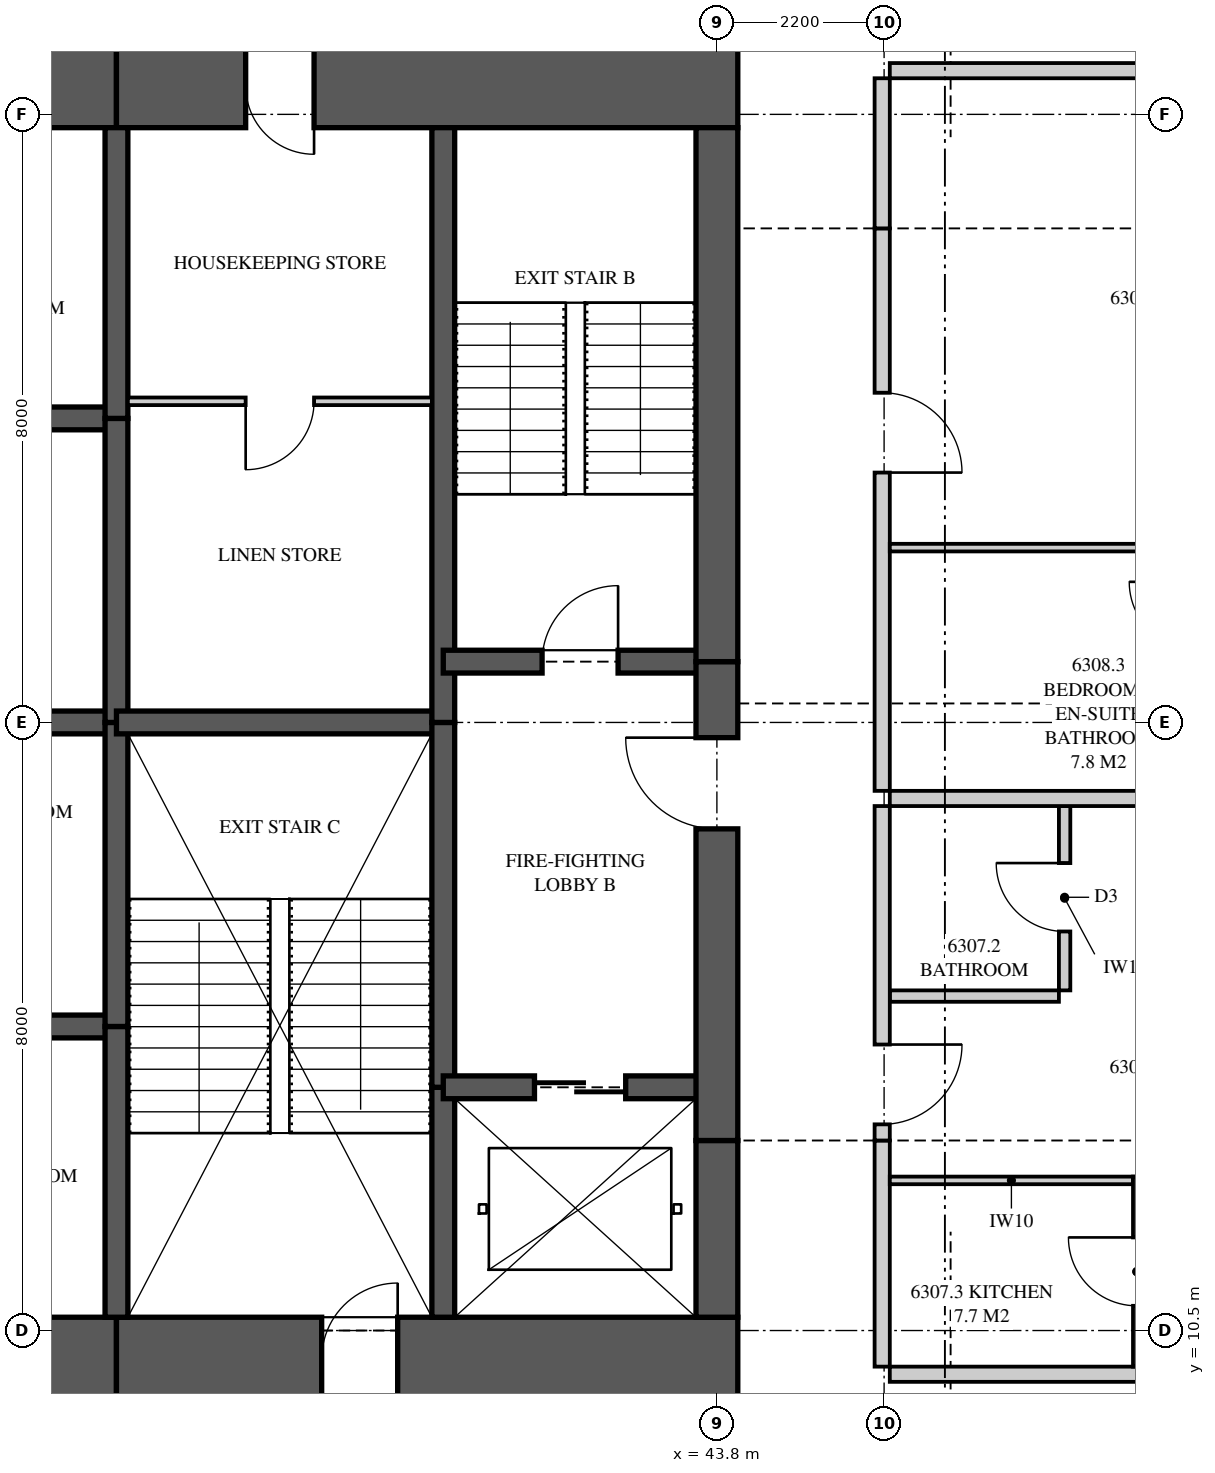
"""IFC4 building model, lengths in metres.
Left out: names, types, materials, properties, quantities, classifications, styles, units other than length and angle.
Written with IfcOpenShell. Run it as: python <this file> out.ifc"""

import sys

from ifc_helpers import new_model, si_unit, direction, frame, frame_2d, origin, place, context, subcontext, project, spatial, polyline, rectangle, outline, extrude, element, fill, save


model = new_model("IFC4")
c1 = context("Model", 3, precision=1e-05, world=origin(), true_north=direction((0.0, 1.0)))
c2 = subcontext(c1, "Body", "Model", "MODEL_VIEW")
j1 = project(units=[si_unit("LENGTHUNIT", "METRE"), si_unit("PLANEANGLEUNIT", "RADIAN")], contexts=[c1])
p1 = place(None, origin())
s1 = spatial("IfcSite", under=j1, at=p1, CompositionType="ELEMENT")
p2 = place(p1, origin())
s2 = spatial("IfcBuilding", under=s1, at=p2, CompositionType="ELEMENT")
p3 = place(p2, frame((0.0, 0.0, 231.95)))
s3 = spatial("IfcBuildingStorey", under=s2, at=p3, CompositionType="ELEMENT", Elevation=231.95)
p4 = place(p3, frame((31.6, 10.125, 0.0), z_axis=(0.0, 0.0, 1.0), x_axis=(1.0, 0.0, 0.0)))
e1 = element("IfcWall", 1, at=p4, inside=s3, PredefinedType="SHEAR", context=c2, shape_type="SweptSolid", body=[
    extrude(rectangle(XDim=4.3, YDim=1.1, at=frame_2d((2.15, 0.0))), origin(), (0.0, 0.0, 1.0), 3.5),
])
p5 = place(p3, frame((35.9, 10.125, 0.0), z_axis=(0.0, 0.0, 1.0), x_axis=(1.0, 0.0, 0.0)))
e2 = element("IfcWall", 2, at=p5, inside=s3, PredefinedType="SHEAR", context=c2, shape_type="SweptSolid", body=[
    extrude(rectangle(XDim=8.175, YDim=1.1, at=frame_2d((4.087, 0.0))), origin(), (0.0, 0.0, 1.0), 3.5),
])
p6 = place(p5, frame((2.7, 0.0, 0.0)))
e3 = element("IfcOpeningElement", 3, at=p6, cuts=e2, PredefinedType="OPENING", context=c2, shape_type="SweptSolid", body=[
    extrude(rectangle(XDim=1.0, YDim=2.1, at=frame_2d((0.5, 1.05))), frame((0.0, 0.56, 0.0), z_axis=(0.0, -1.0, 0.0), x_axis=(1.0, 0.0, 0.0)), (0.0, 0.0, 1.0), 1.12),
])
p7 = place(p3, frame((44.075, 26.875, 0.0), z_axis=(0.0, 0.0, 1.0), x_axis=(-1.0, 0.0, 0.0)))
e4 = element("IfcWall", 4, at=p7, inside=s3, PredefinedType="SHEAR", context=c2, shape_type="SweptSolid", body=[
    extrude(rectangle(XDim=8.175, YDim=1.1, at=frame_2d((4.087, 0.0))), origin(), (0.0, 0.0, 1.0), 3.5),
])
p8 = place(p7, frame((5.575, 0.0, 0.0)))
e5 = element("IfcOpeningElement", 5, at=p8, cuts=e4, PredefinedType="OPENING", context=c2, shape_type="SweptSolid", body=[
    extrude(rectangle(XDim=0.9, YDim=2.1, at=frame_2d((0.45, 1.05))), frame((0.0, 0.56, 0.0), z_axis=(0.0, -1.0, 0.0), x_axis=(1.0, 0.0, 0.0)), (0.0, 0.0, 1.0), 1.12),
])
p9 = place(p3, frame((35.9, 26.875, 0.0), z_axis=(0.0, 0.0, 1.0), x_axis=(-1.0, 0.0, 0.0)))
e6 = element("IfcWall", 6, at=p9, inside=s3, PredefinedType="SHEAR", context=c2, shape_type="SweptSolid", body=[
    extrude(rectangle(XDim=4.3, YDim=1.1, at=frame_2d((2.15, 0.0))), origin(), (0.0, 0.0, 1.0), 3.5),
])
p10 = place(p3, frame((43.8, 10.675, 0.0), z_axis=(0.0, 0.0, 1.0), x_axis=(0.0, 1.0, 0.0)))
e7 = element("IfcWall", 7, at=p10, inside=s3, PredefinedType="SHEAR", context=c2, shape_type="SweptSolid", body=[
    extrude(rectangle(XDim=2.325, YDim=0.55, at=frame_2d((1.163, 0.0))), origin(), (0.0, 0.0, 1.0), 3.5),
])
p11 = place(p3, frame((43.8, 13.0, 0.0), z_axis=(0.0, 0.0, 1.0), x_axis=(0.0, 1.0, 0.0)))
e8 = element("IfcWall", 8, at=p11, inside=s3, PredefinedType="SHEAR", context=c2, shape_type="SweptSolid", body=[
    extrude(rectangle(XDim=6.3, YDim=0.55, at=frame_2d((3.15, 0.0))), origin(), (0.0, 0.0, 1.0), 3.5),
])
p12 = place(p11, frame((4.1, 0.0, 0.0)))
e9 = element("IfcOpeningElement", 9, at=p12, cuts=e8, PredefinedType="OPENING", context=c2, shape_type="SweptSolid", body=[
    extrude(rectangle(XDim=1.2, YDim=2.2, at=frame_2d((0.6, 1.1))), frame((0.0, 0.285, 0.0), z_axis=(0.0, -1.0, 0.0), x_axis=(1.0, 0.0, 0.0)), (0.0, 0.0, 1.0), 0.57),
])
p13 = place(p3, frame((43.8, 19.3, 0.0), z_axis=(0.0, 0.0, 1.0), x_axis=(0.0, 1.0, 0.0)))
e10 = element("IfcWall", 10, at=p13, inside=s3, PredefinedType="SHEAR", context=c2, shape_type="SweptSolid", body=[
    extrude(rectangle(XDim=7.025, YDim=0.55, at=frame_2d((3.512, 0.0))), origin(), (0.0, 0.0, 1.0), 3.5),
])
p14 = place(p3, frame((35.9, 10.675, 0.0), z_axis=(0.0, 0.0, 1.0), x_axis=(0.0, 1.0, 0.0)))
e11 = element("IfcWall", 11, at=p14, inside=s3, PredefinedType="SHEAR", context=c2, shape_type="SweptSolid", body=[
    extrude(rectangle(XDim=3.825, YDim=0.3, at=frame_2d((1.913, 0.0))), origin(), (0.0, 0.0, 1.0), 3.5),
])
for number, where, z_axis, x_axis in (
    (12, (35.9, 14.5, 0.0), (0.0, 0.0, 1.0), (0.0, 1.0, 0.0)),
    (13, (35.9, 18.5, 0.0), (0.0, 0.0, 1.0), (0.0, 1.0, 0.0)),
):
    element("IfcWall", number, at=place(p3, frame(where, z_axis=z_axis, x_axis=x_axis)), inside=s3, PredefinedType="SHEAR", context=c2, shape_type="SweptSolid", body=[
        extrude(rectangle(XDim=4.0, YDim=0.3, at=frame_2d((2.0, 0.0))), origin(), (0.0, 0.0, 1.0), 3.5),
    ])
p15 = place(p3, frame((35.9, 22.5, 0.0), z_axis=(0.0, 0.0, 1.0), x_axis=(0.0, 1.0, 0.0)))
e14 = element("IfcWall", 14, at=p15, inside=s3, PredefinedType="SHEAR", context=c2, shape_type="SweptSolid", body=[
    extrude(rectangle(XDim=3.825, YDim=0.3, at=frame_2d((1.913, 0.0))), origin(), (0.0, 0.0, 1.0), 3.5),
])
p16 = place(p3, frame((40.2, 10.675, 0.0), z_axis=(0.0, 0.0, 1.0), x_axis=(0.0, 1.0, 0.0)))
e15 = element("IfcWall", 15, at=p16, inside=s3, PredefinedType="SHEAR", context=c2, shape_type="SweptSolid", body=[
    extrude(rectangle(XDim=3.025, YDim=0.3, at=frame_2d((1.512, 0.0))), origin(), (0.0, 0.0, 1.0), 3.5),
])
p17 = place(p3, frame((40.2, 13.7, 0.0), z_axis=(0.0, 0.0, 1.0), x_axis=(0.0, 1.0, 0.0)))
e16 = element("IfcWall", 16, at=p17, inside=s3, PredefinedType="SHEAR", context=c2, shape_type="SweptSolid", body=[
    extrude(rectangle(XDim=4.8, YDim=0.3, at=frame_2d((2.4, 0.0))), origin(), (0.0, 0.0, 1.0), 3.5),
])
p18 = place(p3, frame((40.2, 18.5, 0.0), z_axis=(0.0, 0.0, 1.0), x_axis=(0.0, 1.0, 0.0)))
e17 = element("IfcWall", 17, at=p18, inside=s3, PredefinedType="SHEAR", context=c2, shape_type="SweptSolid", body=[
    extrude(rectangle(XDim=7.825, YDim=0.3, at=frame_2d((3.913, 0.0))), origin(), (0.0, 0.0, 1.0), 3.5),
])
for number, where, z_axis, x_axis in (
    (18, (31.6, 14.5, 0.0), (0.0, 0.0, 1.0), (1.0, 0.0, 0.0)),
    (19, (31.6, 18.5, 0.0), (0.0, 0.0, 1.0), (1.0, 0.0, 0.0)),
    (20, (31.6, 22.5, 0.0), (0.0, 0.0, 1.0), (1.0, 0.0, 0.0)),
):
    element("IfcWall", number, at=place(p3, frame(where, z_axis=z_axis, x_axis=x_axis)), inside=s3, PredefinedType="SHEAR", context=c2, shape_type="SweptSolid", body=[
        extrude(rectangle(XDim=4.3, YDim=0.3, at=frame_2d((2.15, 0.0))), origin(), (0.0, 0.0, 1.0), 3.5),
    ])
p19 = place(p3, frame((35.9, 18.5, 0.0), z_axis=(0.0, 0.0, 1.0), x_axis=(1.0, 0.0, 0.0)))
e21 = element("IfcWall", 21, at=p19, inside=s3, PredefinedType="SHEAR", context=c2, shape_type="SweptSolid", body=[
    extrude(rectangle(XDim=4.3, YDim=0.3, at=frame_2d((2.15, 0.0))), origin(), (0.0, 0.0, 1.0), 3.5),
])
p20 = place(p3, frame((40.2, 13.7, 0.0), z_axis=(0.0, 0.0, 1.0), x_axis=(1.0, 0.0, 0.0)))
e22 = element("IfcWall", 22, at=p20, inside=s3, PredefinedType="SHEAR", context=c2, shape_type="SweptSolid", body=[
    extrude(rectangle(XDim=3.6, YDim=0.3, at=frame_2d((1.8, 0.0))), origin(), (0.0, 0.0, 1.0), 3.5),
])
p21 = place(p20, frame((1.2, 0.0, 0.0)))
e23 = element("IfcOpeningElement", 23, at=p21, cuts=e22, PredefinedType="OPENING", context=c2, shape_type="SweptSolid", body=[
    extrude(rectangle(XDim=1.2, YDim=2.1, at=frame_2d((0.6, 1.05))), frame((0.0, 0.16, 0.0), z_axis=(0.0, -1.0, 0.0), x_axis=(1.0, 0.0, 0.0)), (0.0, 0.0, 1.0), 0.32),
])
p22 = place(p3, frame((40.2, 19.3, 0.0), z_axis=(0.0, 0.0, 1.0), x_axis=(1.0, 0.0, 0.0)))
e24 = element("IfcWall", 24, at=p22, inside=s3, PredefinedType="SHEAR", context=c2, shape_type="SweptSolid", body=[
    extrude(rectangle(XDim=3.6, YDim=0.3, at=frame_2d((1.8, 0.0))), origin(), (0.0, 0.0, 1.0), 3.5),
])
p23 = place(p22, frame((1.3, 0.0, 0.0)))
e25 = element("IfcOpeningElement", 25, at=p23, cuts=e24, PredefinedType="OPENING", context=c2, shape_type="SweptSolid", body=[
    extrude(rectangle(XDim=1.0, YDim=2.1, at=frame_2d((0.5, 1.05))), frame((0.0, 0.16, 0.0), z_axis=(0.0, -1.0, 0.0), x_axis=(1.0, 0.0, 0.0)), (0.0, 0.0, 1.0), 0.32),
])
p24 = place(p3, frame((46.075, 9.925, 0.0), z_axis=(0.0, 0.0, 1.0), x_axis=(1.0, 0.0, 0.0)))
e26 = element("IfcWall", 26, at=p24, inside=s3, PredefinedType="PARTITIONING", context=c2, shape_type="SweptSolid", body=[
    extrude(outline(polyline([(0.0, 0.0), (10.25, 0.0), (10.25, 3.26), (10.033, 3.26), (10.033, 2.3), (8.201, 2.3), (8.201, 3.26), (2.11, 3.26), (2.11, 2.66), (0.0, 2.66), (0.0, 3.26), (0.0, 0.0)])), frame((0.0, 0.1, 0.0), z_axis=(0.0, -1.0, 0.0), x_axis=(1.0, 0.0, 0.0)), (0.0, 0.0, 1.0), 0.2),
])
p25 = place(p3, frame((46.075, 27.075, 0.0), z_axis=(0.0, 0.0, 1.0), x_axis=(1.0, 0.0, 0.0)))
e27 = element("IfcWall", 27, at=p25, inside=s3, PredefinedType="PARTITIONING", context=c2, shape_type="SweptSolid", body=[
    extrude(outline(polyline([(0.0, 0.0), (10.25, 0.0), (10.25, 3.26), (10.017, 3.26), (10.017, 2.3), (8.166, 2.3), (8.166, 3.26), (2.11, 3.26), (2.11, 2.66), (0.0, 2.66), (0.0, 3.26), (0.0, 0.0)])), frame((0.0, 0.1, 0.0), z_axis=(0.0, -1.0, 0.0), x_axis=(1.0, 0.0, 0.0)), (0.0, 0.0, 1.0), 0.2),
])
p26 = place(p3, frame((56.325, 17.5, 0.0), z_axis=(0.0, 0.0, 1.0), x_axis=(-1.0, 0.0, 0.0)))
e28 = element("IfcWall", 28, at=p26, inside=s3, PredefinedType="PARTITIONING", context=c2, shape_type="SweptSolid", body=[
    extrude(outline(polyline([(0.0, 0.0), (10.25, 0.0), (10.25, 3.26), (10.25, 2.66), (1.685, 2.66), (1.685, 2.3), (0.0, 2.3), (0.0, 3.26), (0.0, 0.0)])), frame((0.0, 0.1, 0.0), z_axis=(0.0, -1.0, 0.0), x_axis=(1.0, 0.0, 0.0)), (0.0, 0.0, 1.0), 0.2),
])
p27 = place(p3, frame((45.975, 10.025, 0.0), z_axis=(0.0, 0.0, 1.0), x_axis=(0.0, 1.0, 0.0)))
e29 = element("IfcWall", 29, at=p27, inside=s3, PredefinedType="PARTITIONING", context=c2, shape_type="SweptSolid", body=[
    extrude(rectangle(XDim=2.975, YDim=0.2, at=frame_2d((1.488, 0.0))), origin(), (0.0, 0.0, 1.0), 2.66),
])
p28 = place(p3, frame((45.975, 13.0, 0.0), z_axis=(0.0, 0.0, 1.0), x_axis=(0.0, 1.0, 0.0)))
e30 = element("IfcWall", 30, at=p28, inside=s3, PredefinedType="PARTITIONING", context=c2, shape_type="SweptSolid", body=[
    extrude(outline(polyline([(0.0, 0.0), (4.4, 0.0), (4.4, 3.26), (1.31, 3.26), (1.31, 2.66), (0.0, 2.66), (0.0, 0.0)])), frame((0.0, 0.1, 0.0), z_axis=(0.0, -1.0, 0.0), x_axis=(1.0, 0.0, 0.0)), (0.0, 0.0, 1.0), 0.2),
])
p29 = place(p28, frame((0.212, 0.0, 0.0)))
e31 = element("IfcOpeningElement", 31, at=p29, cuts=e30, PredefinedType="OPENING", context=c2, shape_type="SweptSolid", body=[
    extrude(rectangle(XDim=1.05, YDim=2.2, at=frame_2d((0.525, 1.1))), frame((0.0, 0.11, 0.0), z_axis=(0.0, -1.0, 0.0), x_axis=(1.0, 0.0, 0.0)), (0.0, 0.0, 1.0), 0.22),
])
p30 = place(p3, frame((48.375, 14.975, 0.0), z_axis=(0.0, 0.0, 1.0), x_axis=(0.0, 1.0, 0.0)))
e32 = element("IfcWall", 32, at=p30, inside=s3, PredefinedType="PLUMBINGWALL", context=c2, shape_type="SweptSolid", body=[
    extrude(rectangle(XDim=2.425, YDim=0.15, at=frame_2d((1.212, 0.0))), origin(), (0.0, 0.0, 1.0), 3.26),
])
p31 = place(p30, frame((0.775, 0.0, 0.0)))
e33 = element("IfcOpeningElement", 33, at=p31, cuts=e32, PredefinedType="OPENING", context=c2, shape_type="SweptSolid", body=[
    extrude(rectangle(XDim=0.9, YDim=2.1, at=frame_2d((0.45, 1.05))), frame((0.0, 0.085, 0.0), z_axis=(0.0, -1.0, 0.0), x_axis=(1.0, 0.0, 0.0)), (0.0, 0.0, 1.0), 0.17),
])
p32 = place(p3, frame((48.3, 14.9, 0.0), z_axis=(0.0, 0.0, 1.0), x_axis=(-1.0, 0.0, 0.0)))
e34 = element("IfcWall", 34, at=p32, inside=s3, PredefinedType="PLUMBINGWALL", context=c2, shape_type="SweptSolid", body=[
    extrude(rectangle(XDim=2.225, YDim=0.15, at=frame_2d((1.113, 0.0))), origin(), (0.0, 0.0, 1.0), 3.26),
])
p33 = place(p3, frame((45.975, 17.6, 0.0), z_axis=(0.0, 0.0, 1.0), x_axis=(0.0, 1.0, 0.0)))
e35 = element("IfcWall", 35, at=p33, inside=s3, PredefinedType="PARTITIONING", context=c2, shape_type="SweptSolid", body=[
    extrude(outline(polyline([(0.0, 0.0), (7.4, 0.0), (7.4, 2.66), (6.09, 2.66), (6.09, 3.26), (2.46, 3.26), (2.46, 2.66), (0.0, 2.66), (0.0, 0.0)])), frame((0.0, 0.1, 0.0), z_axis=(0.0, -1.0, 0.0), x_axis=(1.0, 0.0, 0.0)), (0.0, 0.0, 1.0), 0.2),
])
p34 = place(p33, frame((4.188, 0.0, 0.0)))
e36 = element("IfcOpeningElement", 36, at=p34, cuts=e35, PredefinedType="OPENING", context=c2, shape_type="SweptSolid", body=[
    extrude(rectangle(XDim=1.05, YDim=2.2, at=frame_2d((0.525, 1.1))), frame((0.0, 0.11, 0.0), z_axis=(0.0, -1.0, 0.0), x_axis=(1.0, 0.0, 0.0)), (0.0, 0.0, 1.0), 0.22),
])
p35 = place(p3, frame((45.975, 25.0, 0.0), z_axis=(0.0, 0.0, 1.0), x_axis=(0.0, 1.0, 0.0)))
e37 = element("IfcWall", 37, at=p35, inside=s3, PredefinedType="PARTITIONING", context=c2, shape_type="SweptSolid", body=[
    extrude(rectangle(XDim=1.975, YDim=0.2, at=frame_2d((0.988, 0.0))), origin(), (0.0, 0.0, 1.0), 2.66),
])
p36 = place(p3, frame((56.325, 20.8, 0.0), z_axis=(0.0, 0.0, 1.0), x_axis=(-1.0, 0.0, 0.0)))
e38 = element("IfcWall", 38, at=p36, inside=s3, PredefinedType="PARTITIONING", context=c2, shape_type="SweptSolid", body=[
    extrude(outline(polyline([(0.0, 0.0), (10.25, 0.0), (10.25, 3.26), (1.635, 3.26), (1.635, 2.3), (0.0, 2.3), (0.0, 3.26), (0.0, 0.0)])), frame((0.0, 0.05, 0.0), z_axis=(0.0, -1.0, 0.0), x_axis=(1.0, 0.0, 0.0)), (0.0, 0.0, 1.0), 0.1),
])
p37 = place(p36, frame((4.85, 0.0, 0.0)))
e39 = element("IfcOpeningElement", 39, at=p37, cuts=e38, PredefinedType="OPENING", context=c2, shape_type="SweptSolid", body=[
    extrude(rectangle(XDim=0.9, YDim=2.1, at=frame_2d((0.45, 1.05))), frame((0.0, 0.06, 0.0), z_axis=(0.0, -1.0, 0.0), x_axis=(1.0, 0.0, 0.0)), (0.0, 0.0, 1.0), 0.12),
])
p38 = place(p3, frame((49.325, 10.025, 0.0), z_axis=(0.0, 0.0, 1.0), x_axis=(0.0, 1.0, 0.0)))
e40 = element("IfcWall", 40, at=p38, inside=s3, PredefinedType="PARTITIONING", context=c2, shape_type="SweptSolid", body=[
    extrude(outline(polyline([(0.0, 0.0), (2.5, 0.0), (2.5, 3.26), (2.5, 2.66), (1.715, 2.66), (1.715, 3.26), (0.0, 3.26), (0.0, 0.0)])), frame((0.0, 0.05, 0.0), z_axis=(0.0, -1.0, 0.0), x_axis=(1.0, 0.0, 0.0)), (0.0, 0.0, 1.0), 0.1),
])
p39 = place(p38, frame((0.8, 0.0, 0.0)))
e41 = element("IfcOpeningElement", 41, at=p39, cuts=e40, PredefinedType="OPENING", context=c2, shape_type="SweptSolid", body=[
    extrude(rectangle(XDim=0.9, YDim=2.1, at=frame_2d((0.45, 1.05))), frame((0.0, 0.06, 0.0), z_axis=(0.0, -1.0, 0.0), x_axis=(1.0, 0.0, 0.0)), (0.0, 0.0, 1.0), 0.12),
])
p40 = place(p3, frame((46.075, 12.475, 0.0), z_axis=(0.0, 0.0, 1.0), x_axis=(1.0, 0.0, 0.0)))
e42 = element("IfcWall", 42, at=p40, inside=s3, PredefinedType="PARTITIONING", context=c2, shape_type="SweptSolid", body=[
    extrude(outline(polyline([(0.0, 0.0), (3.2, 0.0), (3.2, 3.26), (3.2, 2.66), (2.06, 2.66), (0.0, 2.66), (0.0, 3.26), (0.0, 0.0)])), frame((0.0, 0.05, 0.0), z_axis=(0.0, -1.0, 0.0), x_axis=(1.0, 0.0, 0.0)), (0.0, 0.0, 1.0), 0.1),
])
p41 = place(p3, frame((36.05, 22.725, 0.0), z_axis=(0.0, 0.0, 1.0), x_axis=(1.0, 0.0, 0.0)))
e43 = element("IfcWall", 43, at=p41, inside=s3, PredefinedType="PARTITIONING", context=c2, shape_type="SweptSolid", body=[
    extrude(rectangle(XDim=4.0, YDim=0.1, at=frame_2d((2.0, 0.0))), origin(), (0.0, 0.0, 1.0), 3.26),
])
p42 = place(p41, frame((1.55, 0.0, 0.0)))
e44 = element("IfcOpeningElement", 44, at=p42, cuts=e43, PredefinedType="OPENING", context=c2, shape_type="SweptSolid", body=[
    extrude(rectangle(XDim=0.9, YDim=2.1, at=frame_2d((0.45, 1.05))), frame((0.0, 0.06, 0.0), z_axis=(0.0, -1.0, 0.0), x_axis=(1.0, 0.0, 0.0)), (0.0, 0.0, 1.0), 0.12),
])
p43 = place(p29, frame((1.05, 0.0, 0.0), z_axis=(0.0, 0.0, 1.0), x_axis=(-1.0, 0.0, 0.0)))
e45 = element("IfcDoor", 45, at=p43, inside=s3, OperationType="SINGLE_SWING_LEFT", PredefinedType="DOOR", context=c2, shape_type="SweptSolid", body=[
    extrude(rectangle(XDim=1.05, YDim=2.2, at=frame_2d((0.525, 1.1))), frame((0.0, 0.025, 0.0), z_axis=(0.0, -1.0, 0.0), x_axis=(1.0, 0.0, 0.0)), (0.0, 0.0, 1.0), 0.05),
])
fill(e31, e45)
p44 = place(p31, origin())
e46 = element("IfcDoor", 46, at=p44, inside=s3, OperationType="SINGLE_SWING_RIGHT", PredefinedType="DOOR", context=c2, shape_type="SweptSolid", body=[
    extrude(rectangle(XDim=0.9, YDim=2.1, at=frame_2d((0.45, 1.05))), frame((0.0, 0.025, 0.0), z_axis=(0.0, -1.0, 0.0), x_axis=(1.0, 0.0, 0.0)), (0.0, 0.0, 1.0), 0.05),
])
fill(e33, e46)
p45 = place(p34, frame((1.05, 0.0, 0.0), z_axis=(0.0, 0.0, 1.0), x_axis=(-1.0, 0.0, 0.0)))
e47 = element("IfcDoor", 47, at=p45, inside=s3, OperationType="SINGLE_SWING_RIGHT", PredefinedType="DOOR", context=c2, shape_type="SweptSolid", body=[
    extrude(rectangle(XDim=1.05, YDim=2.2, at=frame_2d((0.525, 1.1))), frame((0.0, 0.025, 0.0), z_axis=(0.0, -1.0, 0.0), x_axis=(1.0, 0.0, 0.0)), (0.0, 0.0, 1.0), 0.05),
])
fill(e36, e47)
p46 = place(p42, frame((0.9, 0.0, 0.0), z_axis=(0.0, 0.0, 1.0), x_axis=(-1.0, 0.0, 0.0)))
e48 = element("IfcDoor", 48, at=p46, inside=s3, OperationType="SINGLE_SWING_RIGHT", PredefinedType="DOOR", context=c2, shape_type="SweptSolid", body=[
    extrude(rectangle(XDim=0.9, YDim=2.1, at=frame_2d((0.45, 1.05))), frame((0.0, 0.025, 0.0), z_axis=(0.0, -1.0, 0.0), x_axis=(1.0, 0.0, 0.0)), (0.0, 0.0, 1.0), 0.05),
])
fill(e44, e48)
p47 = place(p23, origin())
e49 = element("IfcDoor", 49, at=p47, inside=s3, OperationType="SINGLE_SWING_RIGHT", PredefinedType="DOOR", context=c2, shape_type="SweptSolid", body=[
    extrude(rectangle(XDim=1.0, YDim=2.1, at=frame_2d((0.5, 1.05))), frame((0.0, 0.025, 0.0), z_axis=(0.0, -1.0, 0.0), x_axis=(1.0, 0.0, 0.0)), (0.0, 0.0, 1.0), 0.05),
])
fill(e25, e49)
p48 = place(p12, origin())
e50 = element("IfcDoor", 50, at=p48, inside=s3, OperationType="SINGLE_SWING_RIGHT", PredefinedType="DOOR", context=c2, shape_type="SweptSolid", body=[
    extrude(rectangle(XDim=1.2, YDim=2.2, at=frame_2d((0.6, 1.1))), frame((0.0, 0.025, 0.0), z_axis=(0.0, -1.0, 0.0), x_axis=(1.0, 0.0, 0.0)), (0.0, 0.0, 1.0), 0.05),
])
fill(e9, e50)
p49 = place(p21, origin())
e51 = element("IfcDoor", 51, at=p49, inside=s3, OperationType="SLIDING_TO_LEFT", PredefinedType="DOOR", context=c2, shape_type="SweptSolid", body=[
    extrude(rectangle(XDim=1.2, YDim=2.1, at=frame_2d((0.6, 1.05))), frame((0.0, 0.025, 0.0), z_axis=(0.0, -1.0, 0.0), x_axis=(1.0, 0.0, 0.0)), (0.0, 0.0, 1.0), 0.05),
])
fill(e23, e51)
p50 = place(p6, origin())
e52 = element("IfcDoor", 52, at=p50, inside=s3, OperationType="SINGLE_SWING_RIGHT", PredefinedType="DOOR", context=c2, shape_type="SweptSolid", body=[
    extrude(rectangle(XDim=1.0, YDim=2.1, at=frame_2d((0.5, 1.05))), frame((0.0, 0.025, 0.0), z_axis=(0.0, -1.0, 0.0), x_axis=(1.0, 0.0, 0.0)), (0.0, 0.0, 1.0), 0.05),
])
fill(e3, e52)
p51 = place(p8, origin())
e53 = element("IfcDoor", 53, at=p51, inside=s3, OperationType="SINGLE_SWING_LEFT", PredefinedType="DOOR", context=c2, shape_type="SweptSolid", body=[
    extrude(rectangle(XDim=0.9, YDim=2.1, at=frame_2d((0.45, 1.05))), frame((0.0, 0.47, 0.0), z_axis=(0.0, -1.0, 0.0), x_axis=(1.0, 0.0, 0.0)), (0.0, 0.0, 1.0), 0.8),
])
fill(e5, e53)
save(model, sys.argv[1])
